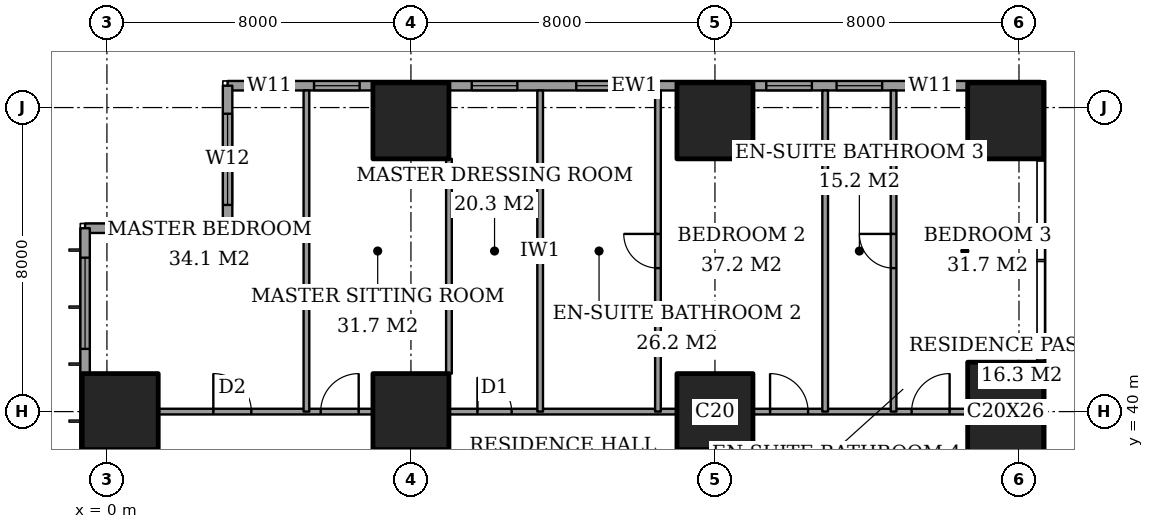
"""IFC4 building model, lengths in metres.
Left out: names, types, materials, properties, quantities, classifications, styles, units other than length and angle.
Written with IfcOpenShell. Run it as: python <this file> out.ifc"""

import sys

from ifc_helpers import new_model, si_unit, direction, frame, frame_2d, origin, origin_2d, place, context, subcontext, project, spatial, rectangle, extrude, element, fill, save


model = new_model("IFC4")
c1 = context("Model", 3, precision=1e-05, world=origin(), true_north=direction((0.0, 1.0)))
c2 = subcontext(c1, "Body", "Model", "MODEL_VIEW")
j1 = project(units=[si_unit("LENGTHUNIT", "METRE"), si_unit("PLANEANGLEUNIT", "RADIAN")], contexts=[c1])
p1 = place(None, origin())
s1 = spatial("IfcSite", under=j1, at=p1, CompositionType="ELEMENT")
p2 = place(p1, origin())
s2 = spatial("IfcBuilding", under=s1, at=p2, CompositionType="ELEMENT")
p3 = place(p2, frame((0.0, 0.0, 103.4)))
s3 = spatial("IfcBuildingStorey", under=s2, at=p3, CompositionType="ELEMENT", Elevation=103.4)
for number, where, z_axis, x_axis in (
    (1, (0.35, 40.0, 0.0), (0.0, 0.0, 1.0), (1.0, 0.0, 0.0)),
    (2, (8.0, 40.0, 0.0), (0.0, 0.0, 1.0), (1.0, 0.0, 0.0)),
    (3, (8.0, 47.65, 0.0), (0.0, 0.0, 1.0), (1.0, 0.0, 0.0)),
    (4, (16.0, 40.0, 0.0), (0.0, 0.0, 1.0), (1.0, 0.0, 0.0)),
    (5, (16.0, 47.65, 0.0), (0.0, 0.0, 1.0), (1.0, 0.0, 0.0)),
):
    element("IfcColumn", number, at=place(p3, frame(where, z_axis=z_axis, x_axis=x_axis)), inside=s3, PredefinedType="COLUMN", context=c2, shape_type="SweptSolid", body=[
        extrude(rectangle(XDim=2.0, YDim=2.0, at=origin_2d()), origin(), (0.0, 0.0, 1.0), 3.6),
    ])
p4 = place(p3, frame((23.65, 40.0, 0.0), z_axis=(0.0, 0.0, 1.0), x_axis=(1.0, 0.0, 0.0)))
e6 = element("IfcColumn", 6, at=p4, inside=s3, PredefinedType="COLUMN", context=c2, shape_type="SweptSolid", body=[
    extrude(rectangle(XDim=2.0, YDim=2.6, at=origin_2d()), origin(), (0.0, 0.0, 1.0), 3.6),
])
p5 = place(p3, frame((23.65, 47.65, 0.0), z_axis=(0.0, 0.0, 1.0), x_axis=(1.0, 0.0, 0.0)))
e7 = element("IfcColumn", 7, at=p5, inside=s3, PredefinedType="COLUMN", context=c2, shape_type="SweptSolid", body=[
    extrude(rectangle(XDim=2.0, YDim=2.0, at=origin_2d()), origin(), (0.0, 0.0, 1.0), 3.6),
])
p6 = place(p3, frame((24.575, 48.575, 0.0), z_axis=(0.0, 0.0, 1.0), x_axis=(-1.0, 0.0, 0.0)))
e8 = element("IfcWall", 8, at=p6, inside=s3, PredefinedType="SOLIDWALL", context=c2, shape_type="SweptSolid", body=[
    extrude(rectangle(XDim=21.4, YDim=0.25, at=frame_2d((10.7, 0.0))), origin(), (0.0, 0.0, 1.0), 3.6),
])
p7 = place(p6, frame((2.3, 0.0, 0.4)))
e9 = element("IfcOpeningElement", 9, at=p7, cuts=e8, PredefinedType="OPENING", context=c2, shape_type="SweptSolid", body=[
    extrude(rectangle(XDim=1.2, YDim=2.2, at=frame_2d((0.6, 1.1))), frame((0.0, 0.135, 0.0), z_axis=(0.0, -1.0, 0.0), x_axis=(1.0, 0.0, 0.0)), (0.0, 0.0, 1.0), 0.27),
])
p8 = place(p6, frame((4.175, 0.0, 0.4)))
e10 = element("IfcOpeningElement", 10, at=p8, cuts=e8, PredefinedType="OPENING", context=c2, shape_type="SweptSolid", body=[
    extrude(rectangle(XDim=1.2, YDim=2.2, at=frame_2d((0.6, 1.1))), frame((0.0, 0.135, 0.0), z_axis=(0.0, -1.0, 0.0), x_axis=(1.0, 0.0, 0.0)), (0.0, 0.0, 1.0), 0.27),
])
p9 = place(p6, frame((6.025, 0.0, 0.4)))
e11 = element("IfcOpeningElement", 11, at=p9, cuts=e8, PredefinedType="OPENING", context=c2, shape_type="SweptSolid", body=[
    extrude(rectangle(XDim=1.2, YDim=2.2, at=frame_2d((0.6, 1.1))), frame((0.0, 0.135, 0.0), z_axis=(0.0, -1.0, 0.0), x_axis=(1.0, 0.0, 0.0)), (0.0, 0.0, 1.0), 0.27),
])
p10 = place(p6, frame((11.025, 0.0, 0.4)))
e12 = element("IfcOpeningElement", 12, at=p10, cuts=e8, PredefinedType="OPENING", context=c2, shape_type="SweptSolid", body=[
    extrude(rectangle(XDim=1.2, YDim=2.2, at=frame_2d((0.6, 1.1))), frame((0.0, 0.135, 0.0), z_axis=(0.0, -1.0, 0.0), x_axis=(1.0, 0.0, 0.0)), (0.0, 0.0, 1.0), 0.27),
])
p11 = place(p6, frame((13.775, 0.0, 0.4)))
e13 = element("IfcOpeningElement", 13, at=p11, cuts=e8, PredefinedType="OPENING", context=c2, shape_type="SweptSolid", body=[
    extrude(rectangle(XDim=1.2, YDim=2.2, at=frame_2d((0.6, 1.1))), frame((0.0, 0.135, 0.0), z_axis=(0.0, -1.0, 0.0), x_axis=(1.0, 0.0, 0.0)), (0.0, 0.0, 1.0), 0.27),
])
p12 = place(p6, frame((17.925, 0.0, 0.4)))
e14 = element("IfcOpeningElement", 14, at=p12, cuts=e8, PredefinedType="OPENING", context=c2, shape_type="SweptSolid", body=[
    extrude(rectangle(XDim=1.2, YDim=2.2, at=frame_2d((0.6, 1.1))), frame((0.0, 0.135, 0.0), z_axis=(0.0, -1.0, 0.0), x_axis=(1.0, 0.0, 0.0)), (0.0, 0.0, 1.0), 0.27),
])
p13 = place(p6, frame((19.7, 0.0, 0.4)))
e15 = element("IfcOpeningElement", 15, at=p13, cuts=e8, PredefinedType="OPENING", context=c2, shape_type="SweptSolid", body=[
    extrude(rectangle(XDim=1.2, YDim=2.2, at=frame_2d((0.6, 1.1))), frame((0.0, 0.135, 0.0), z_axis=(0.0, -1.0, 0.0), x_axis=(1.0, 0.0, 0.0)), (0.0, 0.0, 1.0), 0.27),
])
p14 = place(p3, frame((3.175, 48.575, 0.0), z_axis=(0.0, 0.0, 1.0), x_axis=(0.0, -1.0, 0.0)))
e16 = element("IfcWall", 16, at=p14, inside=s3, PredefinedType="SOLIDWALL", context=c2, shape_type="SweptSolid", body=[
    extrude(rectangle(XDim=3.75, YDim=0.25, at=frame_2d((1.875, 0.0))), origin(), (0.0, 0.0, 1.0), 3.6),
])
p15 = place(p14, frame((0.738, 0.0, 0.4)))
e17 = element("IfcOpeningElement", 17, at=p15, cuts=e16, PredefinedType="OPENING", context=c2, shape_type="SweptSolid", body=[
    extrude(rectangle(XDim=2.4, YDim=2.2, at=frame_2d((1.2, 1.1))), frame((0.0, 0.135, 0.0), z_axis=(0.0, -1.0, 0.0), x_axis=(1.0, 0.0, 0.0)), (0.0, 0.0, 1.0), 0.27),
])
p16 = place(p3, frame((3.175, 44.825, 0.0), z_axis=(0.0, 0.0, 1.0), x_axis=(-1.0, 0.0, 0.0)))
e18 = element("IfcWall", 18, at=p16, inside=s3, PredefinedType="SOLIDWALL", context=c2, shape_type="SweptSolid", body=[
    extrude(rectangle(XDim=3.75, YDim=0.25, at=frame_2d((1.875, 0.0))), origin(), (0.0, 0.0, 1.0), 3.6),
])
p17 = place(p16, frame((0.613, 0.0, 0.4)))
e19 = element("IfcOpeningElement", 19, at=p17, cuts=e18, PredefinedType="OPENING", context=c2, shape_type="SweptSolid", body=[
    extrude(rectangle(XDim=2.4, YDim=2.2, at=frame_2d((1.2, 1.1))), frame((0.0, 0.135, 0.0), z_axis=(0.0, -1.0, 0.0), x_axis=(1.0, 0.0, 0.0)), (0.0, 0.0, 1.0), 0.27),
])
p18 = place(p3, frame((-0.575, 44.825, 0.0), z_axis=(0.0, 0.0, 1.0), x_axis=(0.0, -1.0, 0.0)))
e20 = element("IfcWall", 20, at=p18, inside=s3, PredefinedType="SOLIDWALL", context=c2, shape_type="SweptSolid", body=[
    extrude(rectangle(XDim=41.65, YDim=0.25, at=frame_2d((20.825, 0.0))), origin(), (0.0, 0.0, 1.0), 3.6),
])
p19 = place(p18, frame((0.775, 0.0, 0.4)))
e21 = element("IfcOpeningElement", 21, at=p19, cuts=e20, PredefinedType="OPENING", context=c2, shape_type="SweptSolid", body=[
    extrude(rectangle(XDim=2.4, YDim=2.2, at=frame_2d((1.2, 1.1))), frame((0.0, 0.135, 0.0), z_axis=(0.0, -1.0, 0.0), x_axis=(1.0, 0.0, 0.0)), (0.0, 0.0, 1.0), 0.27),
])
p20 = place(p18, frame((6.1, 0.0, 0.4)))
e22 = element("IfcOpeningElement", 22, at=p20, cuts=e20, PredefinedType="OPENING", context=c2, shape_type="SweptSolid", body=[
    extrude(rectangle(XDim=1.2, YDim=2.2, at=frame_2d((0.6, 1.1))), frame((0.0, 0.135, 0.0), z_axis=(0.0, -1.0, 0.0), x_axis=(1.0, 0.0, 0.0)), (0.0, 0.0, 1.0), 0.27),
])
p21 = place(p18, frame((8.425, 0.0, 0.4)))
e23 = element("IfcOpeningElement", 23, at=p21, cuts=e20, PredefinedType="OPENING", context=c2, shape_type="SweptSolid", body=[
    extrude(rectangle(XDim=2.4, YDim=2.2, at=frame_2d((1.2, 1.1))), frame((0.0, 0.135, 0.0), z_axis=(0.0, -1.0, 0.0), x_axis=(1.0, 0.0, 0.0)), (0.0, 0.0, 1.0), 0.27),
])
p22 = place(p18, frame((15.625, 0.0, 0.4)))
e24 = element("IfcOpeningElement", 24, at=p22, cuts=e20, PredefinedType="OPENING", context=c2, shape_type="SweptSolid", body=[
    extrude(rectangle(XDim=2.4, YDim=2.2, at=frame_2d((1.2, 1.1))), frame((0.0, 0.135, 0.0), z_axis=(0.0, -1.0, 0.0), x_axis=(1.0, 0.0, 0.0)), (0.0, 0.0, 1.0), 0.27),
])
p23 = place(p18, frame((23.625, 0.0, 0.4)))
e25 = element("IfcOpeningElement", 25, at=p23, cuts=e20, PredefinedType="OPENING", context=c2, shape_type="SweptSolid", body=[
    extrude(rectangle(XDim=2.4, YDim=2.2, at=frame_2d((1.2, 1.1))), frame((0.0, 0.135, 0.0), z_axis=(0.0, -1.0, 0.0), x_axis=(1.0, 0.0, 0.0)), (0.0, 0.0, 1.0), 0.27),
])
p24 = place(p18, frame((30.725, 0.0, 0.4)))
e26 = element("IfcOpeningElement", 26, at=p24, cuts=e20, PredefinedType="OPENING", context=c2, shape_type="SweptSolid", body=[
    extrude(rectangle(XDim=2.4, YDim=2.2, at=frame_2d((1.2, 1.1))), frame((0.0, 0.135, 0.0), z_axis=(0.0, -1.0, 0.0), x_axis=(1.0, 0.0, 0.0)), (0.0, 0.0, 1.0), 0.27),
])
p25 = place(p18, frame((34.325, 0.0, 0.4)))
e27 = element("IfcOpeningElement", 27, at=p25, cuts=e20, PredefinedType="OPENING", context=c2, shape_type="SweptSolid", body=[
    extrude(rectangle(XDim=1.2, YDim=2.2, at=frame_2d((0.6, 1.1))), frame((0.0, 0.135, 0.0), z_axis=(0.0, -1.0, 0.0), x_axis=(1.0, 0.0, 0.0)), (0.0, 0.0, 1.0), 0.27),
])
p26 = place(p18, frame((38.475, 0.0, 0.4)))
e28 = element("IfcOpeningElement", 28, at=p26, cuts=e20, PredefinedType="OPENING", context=c2, shape_type="SweptSolid", body=[
    extrude(rectangle(XDim=2.4, YDim=2.2, at=frame_2d((1.2, 1.1))), frame((0.0, 0.135, 0.0), z_axis=(0.0, -1.0, 0.0), x_axis=(1.0, 0.0, 0.0)), (0.0, 0.0, 1.0), 0.27),
])
p27 = place(p3, frame((1.35, 40.0, 0.0), z_axis=(0.0, 0.0, 1.0), x_axis=(1.0, 0.0, 0.0)))
e29 = element("IfcWall", 29, at=p27, inside=s3, PredefinedType="PARTITIONING", context=c2, shape_type="SweptSolid", body=[
    extrude(rectangle(XDim=5.65, YDim=0.15, at=frame_2d((2.825, 0.0))), origin(), (0.0, 0.0, 1.0), 3.35),
])
p28 = place(p27, frame((1.45, 0.0, 0.0)))
e30 = element("IfcOpeningElement", 30, at=p28, cuts=e29, PredefinedType="OPENING", context=c2, shape_type="SweptSolid", body=[
    extrude(rectangle(XDim=1.0, YDim=2.1, at=frame_2d((0.5, 1.05))), frame((0.0, 0.085, 0.0), z_axis=(0.0, -1.0, 0.0), x_axis=(1.0, 0.0, 0.0)), (0.0, 0.0, 1.0), 0.17),
])
p29 = place(p27, frame((4.275, 0.0, 0.0)))
e31 = element("IfcOpeningElement", 31, at=p29, cuts=e29, PredefinedType="OPENING", context=c2, shape_type="SweptSolid", body=[
    extrude(rectangle(XDim=1.0, YDim=2.1, at=frame_2d((0.5, 1.05))), frame((0.0, 0.085, 0.0), z_axis=(0.0, -1.0, 0.0), x_axis=(1.0, 0.0, 0.0)), (0.0, 0.0, 1.0), 0.17),
])
p30 = place(p3, frame((9.0, 40.0, 0.0), z_axis=(0.0, 0.0, 1.0), x_axis=(1.0, 0.0, 0.0)))
e32 = element("IfcWall", 32, at=p30, inside=s3, PredefinedType="PARTITIONING", context=c2, shape_type="SweptSolid", body=[
    extrude(rectangle(XDim=6.0, YDim=0.15, at=frame_2d((3.0, 0.0))), origin(), (0.0, 0.0, 1.0), 3.35),
])
p31 = place(p30, frame((0.75, 0.0, 0.0)))
e33 = element("IfcOpeningElement", 33, at=p31, cuts=e32, PredefinedType="OPENING", context=c2, shape_type="SweptSolid", body=[
    extrude(rectangle(XDim=0.9, YDim=2.1, at=frame_2d((0.45, 1.05))), frame((0.0, 0.085, 0.0), z_axis=(0.0, -1.0, 0.0), x_axis=(1.0, 0.0, 0.0)), (0.0, 0.0, 1.0), 0.17),
])
p32 = place(p3, frame((17.0, 40.0, 0.0), z_axis=(0.0, 0.0, 1.0), x_axis=(1.0, 0.0, 0.0)))
e34 = element("IfcWall", 34, at=p32, inside=s3, PredefinedType="PARTITIONING", context=c2, shape_type="SweptSolid", body=[
    extrude(rectangle(XDim=5.65, YDim=0.15, at=frame_2d((2.825, 0.0))), origin(), (0.0, 0.0, 1.0), 3.35),
])
p33 = place(p32, frame((0.45, 0.0, 0.0)))
e35 = element("IfcOpeningElement", 35, at=p33, cuts=e34, PredefinedType="OPENING", context=c2, shape_type="SweptSolid", body=[
    extrude(rectangle(XDim=1.0, YDim=2.1, at=frame_2d((0.5, 1.05))), frame((0.0, 0.085, 0.0), z_axis=(0.0, -1.0, 0.0), x_axis=(1.0, 0.0, 0.0)), (0.0, 0.0, 1.0), 0.17),
])
p34 = place(p32, frame((4.175, 0.0, 0.0)))
e36 = element("IfcOpeningElement", 36, at=p34, cuts=e34, PredefinedType="OPENING", context=c2, shape_type="SweptSolid", body=[
    extrude(rectangle(XDim=1.0, YDim=2.1, at=frame_2d((0.5, 1.05))), frame((0.0, 0.085, 0.0), z_axis=(0.0, -1.0, 0.0), x_axis=(1.0, 0.0, 0.0)), (0.0, 0.0, 1.0), 0.17),
])
p35 = place(p3, frame((5.25, 40.0, 0.0), z_axis=(0.0, 0.0, 1.0), x_axis=(0.0, 1.0, 0.0)))
e37 = element("IfcWall", 37, at=p35, inside=s3, PredefinedType="PARTITIONING", context=c2, shape_type="SweptSolid", body=[
    extrude(rectangle(XDim=8.45, YDim=0.15, at=frame_2d((4.225, 0.0))), origin(), (0.0, 0.0, 1.0), 3.35),
])
p36 = place(p3, frame((9.0, 41.0, 0.0), z_axis=(0.0, 0.0, 1.0), x_axis=(0.0, 1.0, 0.0)))
e38 = element("IfcWall", 38, at=p36, inside=s3, PredefinedType="PARTITIONING", context=c2, shape_type="SweptSolid", body=[
    extrude(rectangle(XDim=5.65, YDim=0.15, at=frame_2d((2.825, 0.0))), origin(), (0.0, 0.0, 1.0), 3.35),
])
p37 = place(p3, frame((11.4, 40.0, 0.0), z_axis=(0.0, 0.0, 1.0), x_axis=(0.0, 1.0, 0.0)))
e39 = element("IfcWall", 39, at=p37, inside=s3, PredefinedType="PARTITIONING", context=c2, shape_type="SweptSolid", body=[
    extrude(rectangle(XDim=8.45, YDim=0.15, at=frame_2d((4.225, 0.0))), origin(), (0.0, 0.0, 1.0), 3.35),
])
p38 = place(p3, frame((14.5, 40.0, 0.0), z_axis=(0.0, 0.0, 1.0), x_axis=(0.0, 1.0, 0.0)))
e40 = element("IfcWall", 40, at=p38, inside=s3, PredefinedType="PARTITIONING", context=c2, shape_type="SweptSolid", body=[
    extrude(rectangle(XDim=8.45, YDim=0.15, at=frame_2d((4.225, 0.0))), origin(), (0.0, 0.0, 1.0), 3.35),
])
p39 = place(p38, frame((3.775, 0.0, 0.0)))
e41 = element("IfcOpeningElement", 41, at=p39, cuts=e40, PredefinedType="OPENING", context=c2, shape_type="SweptSolid", body=[
    extrude(rectangle(XDim=0.9, YDim=2.1, at=frame_2d((0.45, 1.05))), frame((0.0, 0.085, 0.0), z_axis=(0.0, -1.0, 0.0), x_axis=(1.0, 0.0, 0.0)), (0.0, 0.0, 1.0), 0.17),
])
p40 = place(p3, frame((18.9, 40.0, 0.0), z_axis=(0.0, 0.0, 1.0), x_axis=(0.0, 1.0, 0.0)))
e42 = element("IfcWall", 42, at=p40, inside=s3, PredefinedType="PARTITIONING", context=c2, shape_type="SweptSolid", body=[
    extrude(rectangle(XDim=8.45, YDim=0.15, at=frame_2d((4.225, 0.0))), origin(), (0.0, 0.0, 1.0), 3.35),
])
p41 = place(p3, frame((20.7, 40.0, 0.0), z_axis=(0.0, 0.0, 1.0), x_axis=(0.0, 1.0, 0.0)))
e43 = element("IfcWall", 43, at=p41, inside=s3, PredefinedType="PARTITIONING", context=c2, shape_type="SweptSolid", body=[
    extrude(rectangle(XDim=8.45, YDim=0.15, at=frame_2d((4.225, 0.0))), origin(), (0.0, 0.0, 1.0), 3.35),
])
p42 = place(p41, frame((3.775, 0.0, 0.0)))
e44 = element("IfcOpeningElement", 44, at=p42, cuts=e43, PredefinedType="OPENING", context=c2, shape_type="SweptSolid", body=[
    extrude(rectangle(XDim=0.9, YDim=2.1, at=frame_2d((0.45, 1.05))), frame((0.0, 0.085, 0.0), z_axis=(0.0, -1.0, 0.0), x_axis=(1.0, 0.0, 0.0)), (0.0, 0.0, 1.0), 0.17),
])
p43 = place(p7, origin())
e45 = element("IfcWindow", 45, at=p43, inside=s3, PartitioningType="SINGLE_PANEL", PredefinedType="WINDOW", context=c2, shape_type="SweptSolid", body=[
    extrude(rectangle(XDim=1.2, YDim=2.2, at=frame_2d((0.6, 1.1))), frame((0.0, 0.03, 0.0), z_axis=(0.0, -1.0, 0.0), x_axis=(1.0, 0.0, 0.0)), (0.0, 0.0, 1.0), 0.06),
])
fill(e9, e45)
p44 = place(p8, origin())
e46 = element("IfcWindow", 46, at=p44, inside=s3, PartitioningType="SINGLE_PANEL", PredefinedType="WINDOW", context=c2, shape_type="SweptSolid", body=[
    extrude(rectangle(XDim=1.2, YDim=2.2, at=frame_2d((0.6, 1.1))), frame((0.0, 0.03, 0.0), z_axis=(0.0, -1.0, 0.0), x_axis=(1.0, 0.0, 0.0)), (0.0, 0.0, 1.0), 0.06),
])
fill(e10, e46)
p45 = place(p9, origin())
e47 = element("IfcWindow", 47, at=p45, inside=s3, PartitioningType="SINGLE_PANEL", PredefinedType="WINDOW", context=c2, shape_type="SweptSolid", body=[
    extrude(rectangle(XDim=1.2, YDim=2.2, at=frame_2d((0.6, 1.1))), frame((0.0, 0.03, 0.0), z_axis=(0.0, -1.0, 0.0), x_axis=(1.0, 0.0, 0.0)), (0.0, 0.0, 1.0), 0.06),
])
fill(e11, e47)
p46 = place(p10, origin())
e48 = element("IfcWindow", 48, at=p46, inside=s3, PartitioningType="SINGLE_PANEL", PredefinedType="WINDOW", context=c2, shape_type="SweptSolid", body=[
    extrude(rectangle(XDim=1.2, YDim=2.2, at=frame_2d((0.6, 1.1))), frame((0.0, 0.03, 0.0), z_axis=(0.0, -1.0, 0.0), x_axis=(1.0, 0.0, 0.0)), (0.0, 0.0, 1.0), 0.06),
])
fill(e12, e48)
p47 = place(p11, origin())
e49 = element("IfcWindow", 49, at=p47, inside=s3, PartitioningType="SINGLE_PANEL", PredefinedType="WINDOW", context=c2, shape_type="SweptSolid", body=[
    extrude(rectangle(XDim=1.2, YDim=2.2, at=frame_2d((0.6, 1.1))), frame((0.0, 0.03, 0.0), z_axis=(0.0, -1.0, 0.0), x_axis=(1.0, 0.0, 0.0)), (0.0, 0.0, 1.0), 0.06),
])
fill(e13, e49)
p48 = place(p12, origin())
e50 = element("IfcWindow", 50, at=p48, inside=s3, PartitioningType="SINGLE_PANEL", PredefinedType="WINDOW", context=c2, shape_type="SweptSolid", body=[
    extrude(rectangle(XDim=1.2, YDim=2.2, at=frame_2d((0.6, 1.1))), frame((0.0, 0.03, 0.0), z_axis=(0.0, -1.0, 0.0), x_axis=(1.0, 0.0, 0.0)), (0.0, 0.0, 1.0), 0.06),
])
fill(e14, e50)
p49 = place(p13, origin())
e51 = element("IfcWindow", 51, at=p49, inside=s3, PartitioningType="SINGLE_PANEL", PredefinedType="WINDOW", context=c2, shape_type="SweptSolid", body=[
    extrude(rectangle(XDim=1.2, YDim=2.2, at=frame_2d((0.6, 1.1))), frame((0.0, 0.03, 0.0), z_axis=(0.0, -1.0, 0.0), x_axis=(1.0, 0.0, 0.0)), (0.0, 0.0, 1.0), 0.06),
])
fill(e15, e51)
p50 = place(p15, origin())
e52 = element("IfcWindow", 52, at=p50, inside=s3, PartitioningType="SINGLE_PANEL", PredefinedType="WINDOW", context=c2, shape_type="SweptSolid", body=[
    extrude(rectangle(XDim=2.4, YDim=2.2, at=frame_2d((1.2, 1.1))), frame((0.0, 0.03, 0.0), z_axis=(0.0, -1.0, 0.0), x_axis=(1.0, 0.0, 0.0)), (0.0, 0.0, 1.0), 0.06),
])
fill(e17, e52)
p51 = place(p17, origin())
e53 = element("IfcWindow", 53, at=p51, inside=s3, PartitioningType="SINGLE_PANEL", PredefinedType="WINDOW", context=c2, shape_type="SweptSolid", body=[
    extrude(rectangle(XDim=2.4, YDim=2.2, at=frame_2d((1.2, 1.1))), frame((0.0, 0.03, 0.0), z_axis=(0.0, -1.0, 0.0), x_axis=(1.0, 0.0, 0.0)), (0.0, 0.0, 1.0), 0.06),
])
fill(e19, e53)
p52 = place(p19, origin())
e54 = element("IfcWindow", 54, at=p52, inside=s3, PartitioningType="SINGLE_PANEL", PredefinedType="WINDOW", context=c2, shape_type="SweptSolid", body=[
    extrude(rectangle(XDim=2.4, YDim=2.2, at=frame_2d((1.2, 1.1))), frame((0.0, 0.03, 0.0), z_axis=(0.0, -1.0, 0.0), x_axis=(1.0, 0.0, 0.0)), (0.0, 0.0, 1.0), 0.06),
])
fill(e21, e54)
p53 = place(p28, origin())
e55 = element("IfcDoor", 55, at=p53, inside=s3, OperationType="SINGLE_SWING_RIGHT", PredefinedType="DOOR", context=c2, shape_type="SweptSolid", body=[
    extrude(rectangle(XDim=1.0, YDim=2.1, at=frame_2d((0.5, 1.05))), frame((0.0, 0.025, 0.0), z_axis=(0.0, -1.0, 0.0), x_axis=(1.0, 0.0, 0.0)), (0.0, 0.0, 1.0), 0.05),
])
fill(e30, e55)
p54 = place(p29, origin())
e56 = element("IfcDoor", 56, at=p54, inside=s3, OperationType="SINGLE_SWING_LEFT", PredefinedType="DOOR", context=c2, shape_type="SweptSolid", body=[
    extrude(rectangle(XDim=1.0, YDim=2.1, at=frame_2d((0.5, 1.05))), frame((0.0, 0.025, 0.0), z_axis=(0.0, -1.0, 0.0), x_axis=(1.0, 0.0, 0.0)), (0.0, 0.0, 1.0), 0.05),
])
fill(e31, e56)
p55 = place(p31, origin())
e57 = element("IfcDoor", 57, at=p55, inside=s3, OperationType="SINGLE_SWING_RIGHT", PredefinedType="DOOR", context=c2, shape_type="SweptSolid", body=[
    extrude(rectangle(XDim=0.9, YDim=2.1, at=frame_2d((0.45, 1.05))), frame((0.0, 0.025, 0.0), z_axis=(0.0, -1.0, 0.0), x_axis=(1.0, 0.0, 0.0)), (0.0, 0.0, 1.0), 0.05),
])
fill(e33, e57)
p56 = place(p39, origin())
e58 = element("IfcDoor", 58, at=p56, inside=s3, OperationType="SINGLE_SWING_LEFT", PredefinedType="DOOR", context=c2, shape_type="SweptSolid", body=[
    extrude(rectangle(XDim=0.9, YDim=2.1, at=frame_2d((0.45, 1.05))), frame((0.0, 0.025, 0.0), z_axis=(0.0, -1.0, 0.0), x_axis=(1.0, 0.0, 0.0)), (0.0, 0.0, 1.0), 0.05),
])
fill(e41, e58)
p57 = place(p33, origin())
e59 = element("IfcDoor", 59, at=p57, inside=s3, OperationType="SINGLE_SWING_RIGHT", PredefinedType="DOOR", context=c2, shape_type="SweptSolid", body=[
    extrude(rectangle(XDim=1.0, YDim=2.1, at=frame_2d((0.5, 1.05))), frame((0.0, 0.025, 0.0), z_axis=(0.0, -1.0, 0.0), x_axis=(1.0, 0.0, 0.0)), (0.0, 0.0, 1.0), 0.05),
])
fill(e35, e59)
p58 = place(p42, origin())
e60 = element("IfcDoor", 60, at=p58, inside=s3, OperationType="SINGLE_SWING_LEFT", PredefinedType="DOOR", context=c2, shape_type="SweptSolid", body=[
    extrude(rectangle(XDim=0.9, YDim=2.1, at=frame_2d((0.45, 1.05))), frame((0.0, 0.025, 0.0), z_axis=(0.0, -1.0, 0.0), x_axis=(1.0, 0.0, 0.0)), (0.0, 0.0, 1.0), 0.05),
])
fill(e44, e60)
p59 = place(p34, origin())
e61 = element("IfcDoor", 61, at=p59, inside=s3, OperationType="SINGLE_SWING_LEFT", PredefinedType="DOOR", context=c2, shape_type="SweptSolid", body=[
    extrude(rectangle(XDim=1.0, YDim=2.1, at=frame_2d((0.5, 1.05))), frame((0.0, 0.025, 0.0), z_axis=(0.0, -1.0, 0.0), x_axis=(1.0, 0.0, 0.0)), (0.0, 0.0, 1.0), 0.05),
])
fill(e36, e61)
save(model, sys.argv[1])
